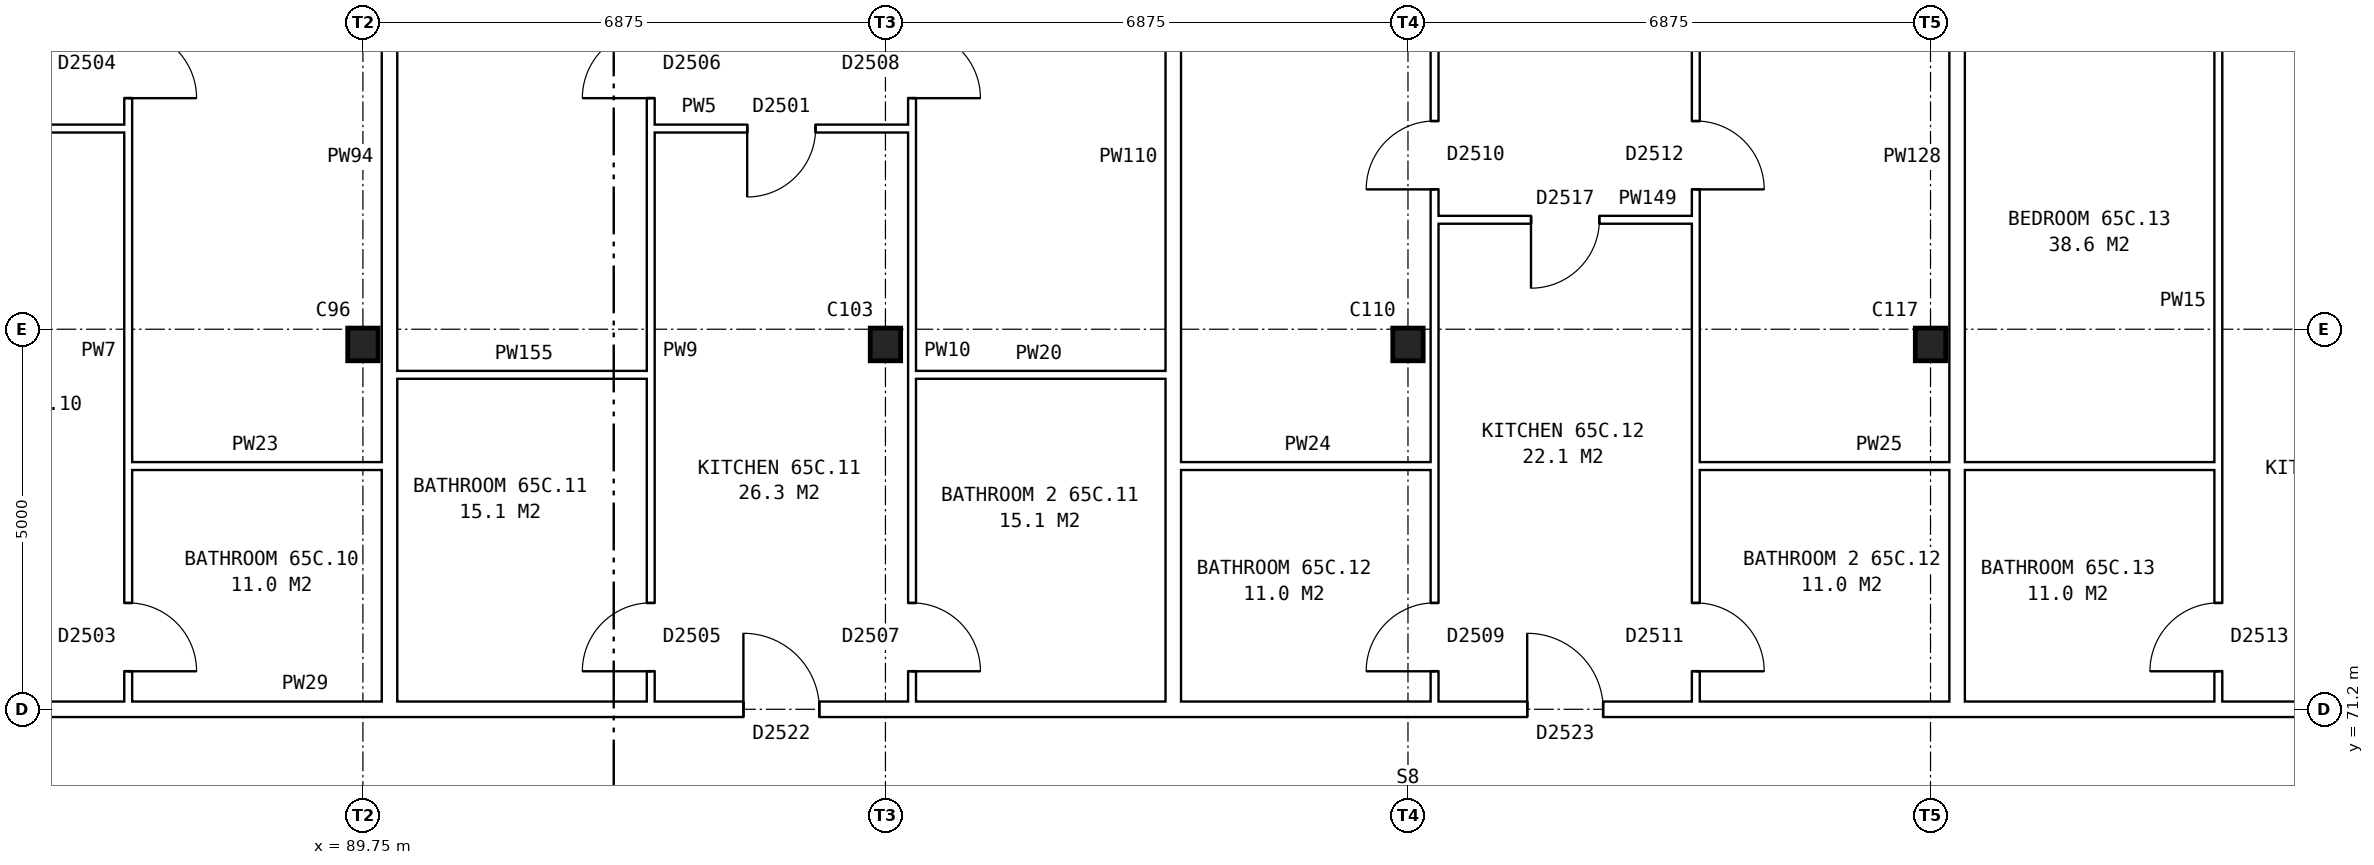
"""IFC4 building model, lengths in metres.
Left out: names, types, materials, properties, quantities, classifications, styles, units other than length and angle.
Written with IfcOpenShell. Run it as: python <this file> out.ifc"""

import sys

from ifc_helpers import new_model, si_unit, direction, frame, frame_2d, origin, origin_2d, place, context, subcontext, project, spatial, rectangle, i_section, extrude, element, fill, save


model = new_model("IFC4")
c1 = context("Model", 3, precision=1e-05, world=origin(), true_north=direction((0.0, 1.0)))
c2 = subcontext(c1, "Body", "Model", "MODEL_VIEW")
j1 = project(units=[si_unit("LENGTHUNIT", "METRE"), si_unit("PLANEANGLEUNIT", "RADIAN")], contexts=[c1])
p1 = place(None, origin())
s1 = spatial("IfcSite", under=j1, at=p1, CompositionType="ELEMENT")
p2 = place(p1, origin())
s2 = spatial("IfcBuilding", under=s1, at=p2, CompositionType="ELEMENT")
p3 = place(p2, frame((0.0, 0.0, 230.7)))
s3 = spatial("IfcBuildingStorey", under=s2, at=p3, CompositionType="ELEMENT", Elevation=230.7)
for number, where, z_axis, x_axis in (
    (1, (89.75, 76.0, 0.0), (0.0, 0.0, 1.0), (1.0, 0.0, 0.0)),
    (2, (96.625, 76.0, 0.0), (0.0, 0.0, 1.0), (1.0, 0.0, 0.0)),
    (3, (103.5, 76.0, 0.0), (0.0, 0.0, 1.0), (1.0, 0.0, 0.0)),
    (4, (110.375, 76.0, 0.0), (0.0, 0.0, 1.0), (1.0, 0.0, 0.0)),
):
    element("IfcColumn", number, at=place(p3, frame(where, z_axis=z_axis, x_axis=x_axis)), inside=s3, PredefinedType="COLUMN", context=c2, shape_type="SweptSolid", body=[
        extrude(i_section(OverallWidth=0.4, OverallDepth=0.43, WebThickness=0.028, FlangeThickness=0.04, at=origin_2d()), origin(), (0.0, 0.0, 1.0), 2.85),
    ])
p4 = place(p3, frame((83.225, 71.2, 0.0), z_axis=(0.0, 0.0, 1.0), x_axis=(1.0, 0.0, 0.0)))
e5 = element("IfcWall", 5, at=p4, inside=s3, PredefinedType="PARTITIONING", context=c2, shape_type="SweptSolid", body=[
    extrude(rectangle(XDim=41.25, YDim=0.2, at=frame_2d((20.625, 0.0))), origin(), (0.0, 0.0, 1.0), 2.85),
])
p5 = place(p4, frame((11.531, 0.0, 0.0)))
e6 = element("IfcOpeningElement", 6, at=p5, cuts=e5, PredefinedType="OPENING", context=c2, shape_type="SweptSolid", body=[
    extrude(rectangle(XDim=1.0, YDim=2.1, at=frame_2d((0.5, 1.05))), frame((0.0, 0.11, 0.0), z_axis=(0.0, -1.0, 0.0), x_axis=(1.0, 0.0, 0.0)), (0.0, 0.0, 1.0), 0.22),
])
p6 = place(p4, frame((21.844, 0.0, 0.0)))
e7 = element("IfcOpeningElement", 7, at=p6, cuts=e5, PredefinedType="OPENING", context=c2, shape_type="SweptSolid", body=[
    extrude(rectangle(XDim=1.0, YDim=2.1, at=frame_2d((0.5, 1.05))), frame((0.0, 0.11, 0.0), z_axis=(0.0, -1.0, 0.0), x_axis=(1.0, 0.0, 0.0)), (0.0, 0.0, 1.0), 0.22),
])
p7 = place(p4, frame((32.156, 0.0, 0.0)))
e8 = element("IfcOpeningElement", 8, at=p7, cuts=e5, PredefinedType="OPENING", context=c2, shape_type="SweptSolid", body=[
    extrude(rectangle(XDim=1.0, YDim=2.1, at=frame_2d((0.5, 1.05))), frame((0.0, 0.11, 0.0), z_axis=(0.0, -1.0, 0.0), x_axis=(1.0, 0.0, 0.0)), (0.0, 0.0, 1.0), 0.22),
])
p8 = place(p3, frame((86.662, 74.4, 0.0), z_axis=(0.0, 0.0, 1.0), x_axis=(1.0, 0.0, 0.0)))
e9 = element("IfcWall", 9, at=p8, inside=s3, PredefinedType="PARTITIONING", context=c2, shape_type="SweptSolid", body=[
    extrude(rectangle(XDim=3.338, YDim=0.1, at=frame_2d((1.669, 0.0))), origin(), (0.0, 0.0, 1.0), 2.85),
])
p9 = place(p3, frame((100.512, 74.4, 0.0), z_axis=(0.0, 0.0, 1.0), x_axis=(1.0, 0.0, 0.0)))
e10 = element("IfcWall", 10, at=p9, inside=s3, PredefinedType="PARTITIONING", context=c2, shape_type="SweptSolid", body=[
    extrude(rectangle(XDim=3.338, YDim=0.1, at=frame_2d((1.669, 0.0))), origin(), (0.0, 0.0, 1.0), 2.85),
])
p10 = place(p3, frame((107.287, 74.4, 0.0), z_axis=(0.0, 0.0, 1.0), x_axis=(1.0, 0.0, 0.0)))
e11 = element("IfcWall", 11, at=p10, inside=s3, PredefinedType="PARTITIONING", context=c2, shape_type="SweptSolid", body=[
    extrude(rectangle(XDim=6.875, YDim=0.1, at=frame_2d((3.438, 0.0))), origin(), (0.0, 0.0, 1.0), 2.85),
])
p11 = place(p3, frame((90.2, 75.6, 0.0), z_axis=(0.0, 0.0, 1.0), x_axis=(1.0, 0.0, 0.0)))
e12 = element("IfcWall", 12, at=p11, inside=s3, PredefinedType="PARTITIONING", context=c2, shape_type="SweptSolid", body=[
    extrude(rectangle(XDim=3.337, YDim=0.1, at=frame_2d((1.668, 0.0))), origin(), (0.0, 0.0, 1.0), 2.85),
])
p12 = place(p3, frame((96.975, 75.6, 0.0), z_axis=(0.0, 0.0, 1.0), x_axis=(1.0, 0.0, 0.0)))
e13 = element("IfcWall", 13, at=p12, inside=s3, PredefinedType="PARTITIONING", context=c2, shape_type="SweptSolid", body=[
    extrude(rectangle(XDim=3.337, YDim=0.1, at=frame_2d((1.668, 0.0))), origin(), (0.0, 0.0, 1.0), 2.85),
])
p13 = place(p3, frame((103.85, 77.64, 0.0), z_axis=(0.0, 0.0, 1.0), x_axis=(1.0, 0.0, 0.0)))
e14 = element("IfcWall", 14, at=p13, inside=s3, PredefinedType="PARTITIONING", context=c2, shape_type="SweptSolid", body=[
    extrude(rectangle(XDim=3.437, YDim=0.1, at=frame_2d((1.719, 0.0))), origin(), (0.0, 0.0, 1.0), 2.85),
])
p14 = place(p13, frame((1.269, 0.0, 0.0)))
e15 = element("IfcOpeningElement", 15, at=p14, cuts=e14, PredefinedType="OPENING", context=c2, shape_type="SweptSolid", body=[
    extrude(rectangle(XDim=0.9, YDim=2.1, at=frame_2d((0.45, 1.05))), frame((0.0, 0.06, 0.0), z_axis=(0.0, -1.0, 0.0), x_axis=(1.0, 0.0, 0.0)), (0.0, 0.0, 1.0), 0.12),
])
p15 = place(p3, frame((83.325, 78.84, 0.0), z_axis=(0.0, 0.0, 1.0), x_axis=(1.0, 0.0, 0.0)))
e16 = element("IfcWall", 16, at=p15, inside=s3, PredefinedType="PARTITIONING", context=c2, shape_type="SweptSolid", body=[
    extrude(rectangle(XDim=3.337, YDim=0.1, at=frame_2d((1.668, 0.0))), origin(), (0.0, 0.0, 1.0), 2.85),
])
p16 = place(p15, frame((1.219, 0.0, 0.0)))
e17 = element("IfcOpeningElement", 17, at=p16, cuts=e16, PredefinedType="OPENING", context=c2, shape_type="SweptSolid", body=[
    extrude(rectangle(XDim=0.9, YDim=2.1, at=frame_2d((0.45, 1.05))), frame((0.0, 0.06, 0.0), z_axis=(0.0, -1.0, 0.0), x_axis=(1.0, 0.0, 0.0)), (0.0, 0.0, 1.0), 0.12),
])
p17 = place(p3, frame((93.537, 78.84, 0.0), z_axis=(0.0, 0.0, 1.0), x_axis=(1.0, 0.0, 0.0)))
e18 = element("IfcWall", 18, at=p17, inside=s3, PredefinedType="PARTITIONING", context=c2, shape_type="SweptSolid", body=[
    extrude(rectangle(XDim=3.438, YDim=0.1, at=frame_2d((1.719, 0.0))), origin(), (0.0, 0.0, 1.0), 2.85),
])
p18 = place(p17, frame((1.269, 0.0, 0.0)))
e19 = element("IfcOpeningElement", 19, at=p18, cuts=e18, PredefinedType="OPENING", context=c2, shape_type="SweptSolid", body=[
    extrude(rectangle(XDim=0.9, YDim=2.1, at=frame_2d((0.45, 1.05))), frame((0.0, 0.06, 0.0), z_axis=(0.0, -1.0, 0.0), x_axis=(1.0, 0.0, 0.0)), (0.0, 0.0, 1.0), 0.12),
])
p19 = place(p3, frame((86.662, 71.3, 0.0), z_axis=(0.0, 0.0, 1.0), x_axis=(0.0, 1.0, 0.0)))
e20 = element("IfcWall", 20, at=p19, inside=s3, PredefinedType="PARTITIONING", context=c2, shape_type="SweptSolid", body=[
    extrude(rectangle(XDim=14.34, YDim=0.1, at=frame_2d((7.17, 0.0))), origin(), (0.0, 0.0, 1.0), 2.85),
])
p20 = place(p19, frame((7.94, 0.0, 0.0)))
e21 = element("IfcOpeningElement", 21, at=p20, cuts=e20, PredefinedType="OPENING", context=c2, shape_type="SweptSolid", body=[
    extrude(rectangle(XDim=0.9, YDim=2.1, at=frame_2d((0.45, 1.05))), frame((0.0, 0.06, 0.0), z_axis=(0.0, -1.0, 0.0), x_axis=(1.0, 0.0, 0.0)), (0.0, 0.0, 1.0), 0.12),
])
p21 = place(p19, frame((0.4, 0.0, 0.0)))
e22 = element("IfcOpeningElement", 22, at=p21, cuts=e20, PredefinedType="OPENING", context=c2, shape_type="SweptSolid", body=[
    extrude(rectangle(XDim=0.9, YDim=2.1, at=frame_2d((0.45, 1.05))), frame((0.0, 0.06, 0.0), z_axis=(0.0, -1.0, 0.0), x_axis=(1.0, 0.0, 0.0)), (0.0, 0.0, 1.0), 0.12),
])
p22 = place(p3, frame((90.1, 71.3, 0.0), z_axis=(0.0, 0.0, 1.0), x_axis=(0.0, 1.0, 0.0)))
e23 = element("IfcWall", 23, at=p22, inside=s3, PredefinedType="PARTITIONING", context=c2, shape_type="SweptSolid", body=[
    extrude(rectangle(XDim=14.34, YDim=0.2, at=frame_2d((7.17, 0.0))), origin(), (0.0, 0.0, 1.0), 2.85),
])
p23 = place(p3, frame((93.537, 71.3, 0.0), z_axis=(0.0, 0.0, 1.0), x_axis=(0.0, 1.0, 0.0)))
e24 = element("IfcWall", 24, at=p23, inside=s3, PredefinedType="PARTITIONING", context=c2, shape_type="SweptSolid", body=[
    extrude(rectangle(XDim=14.34, YDim=0.1, at=frame_2d((7.17, 0.0))), origin(), (0.0, 0.0, 1.0), 2.85),
])
p24 = place(p23, frame((7.94, 0.0, 0.0)))
e25 = element("IfcOpeningElement", 25, at=p24, cuts=e24, PredefinedType="OPENING", context=c2, shape_type="SweptSolid", body=[
    extrude(rectangle(XDim=0.9, YDim=2.1, at=frame_2d((0.45, 1.05))), frame((0.0, 0.06, 0.0), z_axis=(0.0, -1.0, 0.0), x_axis=(1.0, 0.0, 0.0)), (0.0, 0.0, 1.0), 0.12),
])
p25 = place(p23, frame((0.4, 0.0, 0.0)))
e26 = element("IfcOpeningElement", 26, at=p25, cuts=e24, PredefinedType="OPENING", context=c2, shape_type="SweptSolid", body=[
    extrude(rectangle(XDim=0.9, YDim=2.1, at=frame_2d((0.45, 1.05))), frame((0.0, 0.06, 0.0), z_axis=(0.0, -1.0, 0.0), x_axis=(1.0, 0.0, 0.0)), (0.0, 0.0, 1.0), 0.12),
])
p26 = place(p3, frame((96.975, 71.3, 0.0), z_axis=(0.0, 0.0, 1.0), x_axis=(0.0, 1.0, 0.0)))
e27 = element("IfcWall", 27, at=p26, inside=s3, PredefinedType="PARTITIONING", context=c2, shape_type="SweptSolid", body=[
    extrude(rectangle(XDim=14.34, YDim=0.1, at=frame_2d((7.17, 0.0))), origin(), (0.0, 0.0, 1.0), 2.85),
])
p27 = place(p26, frame((7.94, 0.0, 0.0)))
e28 = element("IfcOpeningElement", 28, at=p27, cuts=e27, PredefinedType="OPENING", context=c2, shape_type="SweptSolid", body=[
    extrude(rectangle(XDim=0.9, YDim=2.1, at=frame_2d((0.45, 1.05))), frame((0.0, 0.06, 0.0), z_axis=(0.0, -1.0, 0.0), x_axis=(1.0, 0.0, 0.0)), (0.0, 0.0, 1.0), 0.12),
])
p28 = place(p26, frame((0.4, 0.0, 0.0)))
e29 = element("IfcOpeningElement", 29, at=p28, cuts=e27, PredefinedType="OPENING", context=c2, shape_type="SweptSolid", body=[
    extrude(rectangle(XDim=0.9, YDim=2.1, at=frame_2d((0.45, 1.05))), frame((0.0, 0.06, 0.0), z_axis=(0.0, -1.0, 0.0), x_axis=(1.0, 0.0, 0.0)), (0.0, 0.0, 1.0), 0.12),
])
p29 = place(p3, frame((100.412, 71.3, 0.0), z_axis=(0.0, 0.0, 1.0), x_axis=(0.0, 1.0, 0.0)))
e30 = element("IfcWall", 30, at=p29, inside=s3, PredefinedType="PARTITIONING", context=c2, shape_type="SweptSolid", body=[
    extrude(rectangle(XDim=14.34, YDim=0.2, at=frame_2d((7.17, 0.0))), origin(), (0.0, 0.0, 1.0), 2.85),
])
p30 = place(p3, frame((103.85, 71.3, 0.0), z_axis=(0.0, 0.0, 1.0), x_axis=(0.0, 1.0, 0.0)))
e31 = element("IfcWall", 31, at=p30, inside=s3, PredefinedType="PARTITIONING", context=c2, shape_type="SweptSolid", body=[
    extrude(rectangle(XDim=14.34, YDim=0.1, at=frame_2d((7.17, 0.0))), origin(), (0.0, 0.0, 1.0), 2.85),
])
p31 = place(p30, frame((6.74, 0.0, 0.0)))
e32 = element("IfcOpeningElement", 32, at=p31, cuts=e31, PredefinedType="OPENING", context=c2, shape_type="SweptSolid", body=[
    extrude(rectangle(XDim=0.9, YDim=2.1, at=frame_2d((0.45, 1.05))), frame((0.0, 0.06, 0.0), z_axis=(0.0, -1.0, 0.0), x_axis=(1.0, 0.0, 0.0)), (0.0, 0.0, 1.0), 0.12),
])
p32 = place(p30, frame((0.4, 0.0, 0.0)))
e33 = element("IfcOpeningElement", 33, at=p32, cuts=e31, PredefinedType="OPENING", context=c2, shape_type="SweptSolid", body=[
    extrude(rectangle(XDim=0.9, YDim=2.1, at=frame_2d((0.45, 1.05))), frame((0.0, 0.06, 0.0), z_axis=(0.0, -1.0, 0.0), x_axis=(1.0, 0.0, 0.0)), (0.0, 0.0, 1.0), 0.12),
])
p33 = place(p3, frame((107.287, 71.3, 0.0), z_axis=(0.0, 0.0, 1.0), x_axis=(0.0, 1.0, 0.0)))
e34 = element("IfcWall", 34, at=p33, inside=s3, PredefinedType="PARTITIONING", context=c2, shape_type="SweptSolid", body=[
    extrude(rectangle(XDim=14.34, YDim=0.1, at=frame_2d((7.17, 0.0))), origin(), (0.0, 0.0, 1.0), 2.85),
])
p34 = place(p33, frame((6.74, 0.0, 0.0)))
e35 = element("IfcOpeningElement", 35, at=p34, cuts=e34, PredefinedType="OPENING", context=c2, shape_type="SweptSolid", body=[
    extrude(rectangle(XDim=0.9, YDim=2.1, at=frame_2d((0.45, 1.05))), frame((0.0, 0.06, 0.0), z_axis=(0.0, -1.0, 0.0), x_axis=(1.0, 0.0, 0.0)), (0.0, 0.0, 1.0), 0.12),
])
p35 = place(p33, frame((0.4, 0.0, 0.0)))
e36 = element("IfcOpeningElement", 36, at=p35, cuts=e34, PredefinedType="OPENING", context=c2, shape_type="SweptSolid", body=[
    extrude(rectangle(XDim=0.9, YDim=2.1, at=frame_2d((0.45, 1.05))), frame((0.0, 0.06, 0.0), z_axis=(0.0, -1.0, 0.0), x_axis=(1.0, 0.0, 0.0)), (0.0, 0.0, 1.0), 0.12),
])
p36 = place(p3, frame((110.725, 71.3, 0.0), z_axis=(0.0, 0.0, 1.0), x_axis=(0.0, 1.0, 0.0)))
e37 = element("IfcWall", 37, at=p36, inside=s3, PredefinedType="PARTITIONING", context=c2, shape_type="SweptSolid", body=[
    extrude(rectangle(XDim=14.34, YDim=0.2, at=frame_2d((7.17, 0.0))), origin(), (0.0, 0.0, 1.0), 2.85),
])
p37 = place(p3, frame((114.162, 71.3, 0.0), z_axis=(0.0, 0.0, 1.0), x_axis=(0.0, 1.0, 0.0)))
e38 = element("IfcWall", 38, at=p37, inside=s3, PredefinedType="PARTITIONING", context=c2, shape_type="SweptSolid", body=[
    extrude(rectangle(XDim=14.34, YDim=0.1, at=frame_2d((7.17, 0.0))), origin(), (0.0, 0.0, 1.0), 2.85),
])
p38 = place(p37, frame((9.24, 0.0, 0.0)))
e39 = element("IfcOpeningElement", 39, at=p38, cuts=e38, PredefinedType="OPENING", context=c2, shape_type="SweptSolid", body=[
    extrude(rectangle(XDim=0.9, YDim=2.1, at=frame_2d((0.45, 1.05))), frame((0.0, 0.06, 0.0), z_axis=(0.0, -1.0, 0.0), x_axis=(1.0, 0.0, 0.0)), (0.0, 0.0, 1.0), 0.12),
])
p39 = place(p37, frame((0.4, 0.0, 0.0)))
e40 = element("IfcOpeningElement", 40, at=p39, cuts=e38, PredefinedType="OPENING", context=c2, shape_type="SweptSolid", body=[
    extrude(rectangle(XDim=0.9, YDim=2.1, at=frame_2d((0.45, 1.05))), frame((0.0, 0.06, 0.0), z_axis=(0.0, -1.0, 0.0), x_axis=(1.0, 0.0, 0.0)), (0.0, 0.0, 1.0), 0.12),
])
p40 = place(p20, frame((0.9, 0.0, 0.0), z_axis=(0.0, 0.0, 1.0), x_axis=(-1.0, 0.0, 0.0)))
e41 = element("IfcDoor", 41, at=p40, inside=s3, OperationType="SINGLE_SWING_RIGHT", PredefinedType="DOOR", context=c2, shape_type="SweptSolid", body=[
    extrude(rectangle(XDim=0.9, YDim=2.1, at=frame_2d((0.45, 1.05))), frame((0.0, 0.025, 0.0), z_axis=(0.0, -1.0, 0.0), x_axis=(1.0, 0.0, 0.0)), (0.0, 0.0, 1.0), 0.05),
])
fill(e21, e41)
p41 = place(p21, frame((0.9, 0.0, 0.0), z_axis=(0.0, 0.0, 1.0), x_axis=(-1.0, 0.0, 0.0)))
e42 = element("IfcDoor", 42, at=p41, inside=s3, OperationType="SINGLE_SWING_RIGHT", PredefinedType="DOOR", context=c2, shape_type="SweptSolid", body=[
    extrude(rectangle(XDim=0.9, YDim=2.1, at=frame_2d((0.45, 1.05))), frame((0.0, 0.025, 0.0), z_axis=(0.0, -1.0, 0.0), x_axis=(1.0, 0.0, 0.0)), (0.0, 0.0, 1.0), 0.05),
])
fill(e22, e42)
p42 = place(p24, origin())
e43 = element("IfcDoor", 43, at=p42, inside=s3, OperationType="SINGLE_SWING_LEFT", PredefinedType="DOOR", context=c2, shape_type="SweptSolid", body=[
    extrude(rectangle(XDim=0.9, YDim=2.1, at=frame_2d((0.45, 1.05))), frame((0.0, 0.025, 0.0), z_axis=(0.0, -1.0, 0.0), x_axis=(1.0, 0.0, 0.0)), (0.0, 0.0, 1.0), 0.05),
])
fill(e25, e43)
p43 = place(p27, frame((0.9, 0.0, 0.0), z_axis=(0.0, 0.0, 1.0), x_axis=(-1.0, 0.0, 0.0)))
e44 = element("IfcDoor", 44, at=p43, inside=s3, OperationType="SINGLE_SWING_RIGHT", PredefinedType="DOOR", context=c2, shape_type="SweptSolid", body=[
    extrude(rectangle(XDim=0.9, YDim=2.1, at=frame_2d((0.45, 1.05))), frame((0.0, 0.025, 0.0), z_axis=(0.0, -1.0, 0.0), x_axis=(1.0, 0.0, 0.0)), (0.0, 0.0, 1.0), 0.05),
])
fill(e28, e44)
p44 = place(p5, origin())
e45 = element("IfcDoor", 45, at=p44, inside=s3, OperationType="SINGLE_SWING_LEFT", PredefinedType="DOOR", context=c2, shape_type="SweptSolid", body=[
    extrude(rectangle(XDim=1.0, YDim=2.1, at=frame_2d((0.5, 1.05))), frame((0.0, 0.025, 0.0), z_axis=(0.0, -1.0, 0.0), x_axis=(1.0, 0.0, 0.0)), (0.0, 0.0, 1.0), 0.05),
])
fill(e6, e45)
p45 = place(p18, frame((0.9, 0.0, 0.0), z_axis=(0.0, 0.0, 1.0), x_axis=(-1.0, 0.0, 0.0)))
e46 = element("IfcDoor", 46, at=p45, inside=s3, OperationType="SINGLE_SWING_RIGHT", PredefinedType="DOOR", context=c2, shape_type="SweptSolid", body=[
    extrude(rectangle(XDim=0.9, YDim=2.1, at=frame_2d((0.45, 1.05))), frame((0.0, 0.025, 0.0), z_axis=(0.0, -1.0, 0.0), x_axis=(1.0, 0.0, 0.0)), (0.0, 0.0, 1.0), 0.05),
])
fill(e19, e46)
p46 = place(p25, origin())
e47 = element("IfcDoor", 47, at=p46, inside=s3, OperationType="SINGLE_SWING_LEFT", PredefinedType="DOOR", context=c2, shape_type="SweptSolid", body=[
    extrude(rectangle(XDim=0.9, YDim=2.1, at=frame_2d((0.45, 1.05))), frame((0.0, 0.025, 0.0), z_axis=(0.0, -1.0, 0.0), x_axis=(1.0, 0.0, 0.0)), (0.0, 0.0, 1.0), 0.05),
])
fill(e26, e47)
p47 = place(p28, frame((0.9, 0.0, 0.0), z_axis=(0.0, 0.0, 1.0), x_axis=(-1.0, 0.0, 0.0)))
e48 = element("IfcDoor", 48, at=p47, inside=s3, OperationType="SINGLE_SWING_RIGHT", PredefinedType="DOOR", context=c2, shape_type="SweptSolid", body=[
    extrude(rectangle(XDim=0.9, YDim=2.1, at=frame_2d((0.45, 1.05))), frame((0.0, 0.025, 0.0), z_axis=(0.0, -1.0, 0.0), x_axis=(1.0, 0.0, 0.0)), (0.0, 0.0, 1.0), 0.05),
])
fill(e29, e48)
p48 = place(p31, origin())
e49 = element("IfcDoor", 49, at=p48, inside=s3, OperationType="SINGLE_SWING_LEFT", PredefinedType="DOOR", context=c2, shape_type="SweptSolid", body=[
    extrude(rectangle(XDim=0.9, YDim=2.1, at=frame_2d((0.45, 1.05))), frame((0.0, 0.025, 0.0), z_axis=(0.0, -1.0, 0.0), x_axis=(1.0, 0.0, 0.0)), (0.0, 0.0, 1.0), 0.05),
])
fill(e32, e49)
p49 = place(p34, frame((0.9, 0.0, 0.0), z_axis=(0.0, 0.0, 1.0), x_axis=(-1.0, 0.0, 0.0)))
e50 = element("IfcDoor", 50, at=p49, inside=s3, OperationType="SINGLE_SWING_RIGHT", PredefinedType="DOOR", context=c2, shape_type="SweptSolid", body=[
    extrude(rectangle(XDim=0.9, YDim=2.1, at=frame_2d((0.45, 1.05))), frame((0.0, 0.025, 0.0), z_axis=(0.0, -1.0, 0.0), x_axis=(1.0, 0.0, 0.0)), (0.0, 0.0, 1.0), 0.05),
])
fill(e35, e50)
p50 = place(p6, origin())
e51 = element("IfcDoor", 51, at=p50, inside=s3, OperationType="SINGLE_SWING_LEFT", PredefinedType="DOOR", context=c2, shape_type="SweptSolid", body=[
    extrude(rectangle(XDim=1.0, YDim=2.1, at=frame_2d((0.5, 1.05))), frame((0.0, 0.025, 0.0), z_axis=(0.0, -1.0, 0.0), x_axis=(1.0, 0.0, 0.0)), (0.0, 0.0, 1.0), 0.05),
])
fill(e7, e51)
p51 = place(p14, frame((0.9, 0.0, 0.0), z_axis=(0.0, 0.0, 1.0), x_axis=(-1.0, 0.0, 0.0)))
e52 = element("IfcDoor", 52, at=p51, inside=s3, OperationType="SINGLE_SWING_RIGHT", PredefinedType="DOOR", context=c2, shape_type="SweptSolid", body=[
    extrude(rectangle(XDim=0.9, YDim=2.1, at=frame_2d((0.45, 1.05))), frame((0.0, 0.025, 0.0), z_axis=(0.0, -1.0, 0.0), x_axis=(1.0, 0.0, 0.0)), (0.0, 0.0, 1.0), 0.05),
])
fill(e15, e52)
p52 = place(p32, origin())
e53 = element("IfcDoor", 53, at=p52, inside=s3, OperationType="SINGLE_SWING_LEFT", PredefinedType="DOOR", context=c2, shape_type="SweptSolid", body=[
    extrude(rectangle(XDim=0.9, YDim=2.1, at=frame_2d((0.45, 1.05))), frame((0.0, 0.025, 0.0), z_axis=(0.0, -1.0, 0.0), x_axis=(1.0, 0.0, 0.0)), (0.0, 0.0, 1.0), 0.05),
])
fill(e33, e53)
p53 = place(p35, frame((0.9, 0.0, 0.0), z_axis=(0.0, 0.0, 1.0), x_axis=(-1.0, 0.0, 0.0)))
e54 = element("IfcDoor", 54, at=p53, inside=s3, OperationType="SINGLE_SWING_RIGHT", PredefinedType="DOOR", context=c2, shape_type="SweptSolid", body=[
    extrude(rectangle(XDim=0.9, YDim=2.1, at=frame_2d((0.45, 1.05))), frame((0.0, 0.025, 0.0), z_axis=(0.0, -1.0, 0.0), x_axis=(1.0, 0.0, 0.0)), (0.0, 0.0, 1.0), 0.05),
])
fill(e36, e54)
p54 = place(p39, origin())
e55 = element("IfcDoor", 55, at=p54, inside=s3, OperationType="SINGLE_SWING_LEFT", PredefinedType="DOOR", context=c2, shape_type="SweptSolid", body=[
    extrude(rectangle(XDim=0.9, YDim=2.1, at=frame_2d((0.45, 1.05))), frame((0.0, 0.025, 0.0), z_axis=(0.0, -1.0, 0.0), x_axis=(1.0, 0.0, 0.0)), (0.0, 0.0, 1.0), 0.05),
])
fill(e40, e55)
save(model, sys.argv[1])
